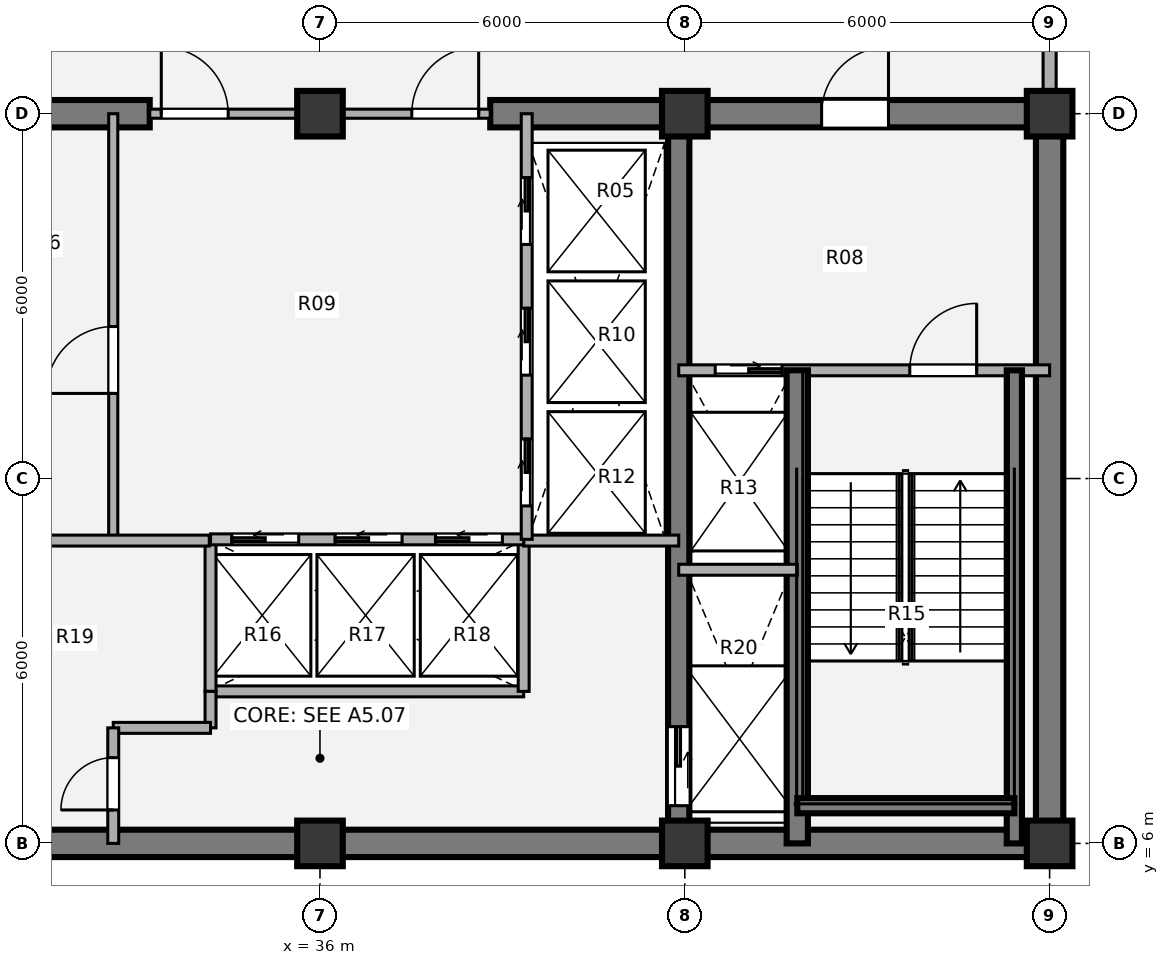
"""IFC4 building model, lengths in metres.
Left out: names, types, materials, properties, quantities, classifications, styles, units other than length and angle.
Written with IfcOpenShell. Run it as: python <this file> out.ifc"""

import sys

from ifc_helpers import new_model, si_unit, direction, frame, frame_2d, origin, origin_2d, place, context, subcontext, project, spatial, rectangle, extrude, source, transform, mapped, element, fill, save


model = new_model("IFC4")
c1 = context("Model", 3, precision=1e-05, world=origin(), true_north=direction((0.0, 1.0)))
c2 = subcontext(c1, "Body", "Model", "MODEL_VIEW")
j1 = project(units=[si_unit("LENGTHUNIT", "METRE"), si_unit("PLANEANGLEUNIT", "RADIAN")], contexts=[c1])
p1 = place(None, origin())
s1 = spatial("IfcSite", under=j1, at=p1, CompositionType="ELEMENT")
p2 = place(p1, origin())
s2 = spatial("IfcBuilding", under=s1, at=p2, CompositionType="ELEMENT")
p3 = place(p2, frame((0.0, 0.0, 151.92)))
s3 = spatial("IfcBuildingStorey", under=s2, at=p3, CompositionType="ELEMENT", Elevation=151.92)
m1 = source(origin(), c2, "Body", "SweptSolid", [
    extrude(rectangle(XDim=0.75, YDim=0.75, at=origin_2d()), origin(), (0.0, 0.0, 1.0), 4.5),
])
for number, where, z_axis, x_axis in (
    (1, (36.0, 6.0, 0.0), (0.0, 0.0, 1.0), (1.0, 0.0, 0.0)),
    (2, (42.0, 6.0, 0.0), (0.0, 0.0, 1.0), (1.0, 0.0, 0.0)),
    (3, (48.0, 6.0, 0.0), (0.0, 0.0, 1.0), (1.0, 0.0, 0.0)),
    (4, (36.0, 18.0, 0.0), (0.0, 0.0, 1.0), (1.0, 0.0, 0.0)),
    (5, (42.0, 18.0, 0.0), (0.0, 0.0, 1.0), (1.0, 0.0, 0.0)),
    (6, (48.0, 18.0, 0.0), (0.0, 0.0, 1.0), (1.0, 0.0, 0.0)),
):
    element("IfcColumn", number, at=place(p3, frame(where, z_axis=z_axis, x_axis=x_axis)), inside=s3, PredefinedType="COLUMN", context=c2, shape_type="MappedRepresentation", body=[
        mapped(m1, transform((0.0, 0.0, 0.0), x_axis=(1.0, 0.0, 0.0), y_axis=(0.0, 1.0, 0.0), z_axis=(0.0, 0.0, 1.0), scale=1.0)),
    ])
p4 = place(p3, frame((48.225, 6.0, 0.0), z_axis=(0.0, 0.0, 1.0), x_axis=(-1.0, 0.0, 0.0)))
e7 = element("IfcWall", 7, at=p4, inside=s3, PredefinedType="SHEAR", context=c2, shape_type="SweptSolid", body=[
    extrude(rectangle(XDim=24.45, YDim=0.45, at=frame_2d((12.225, 0.0))), origin(), (0.0, 0.0, 1.0), 4.5),
])
p5 = place(p3, frame((48.0, 18.0, 0.0), z_axis=(0.0, 0.0, 1.0), x_axis=(0.0, -1.0, 0.0)))
e8 = element("IfcWall", 8, at=p5, inside=s3, PredefinedType="SHEAR", context=c2, shape_type="SweptSolid", body=[
    extrude(rectangle(XDim=12.0, YDim=0.45, at=frame_2d((6.0, 0.0))), origin(), (0.0, 0.0, 1.0), 4.5),
])
p6 = place(p3, frame((23.775, 18.0, 0.0), z_axis=(0.0, 0.0, 1.0), x_axis=(1.0, 0.0, 0.0)))
e9 = element("IfcWall", 9, at=p6, inside=s3, PredefinedType="SHEAR", context=c2, shape_type="SweptSolid", body=[
    extrude(rectangle(XDim=9.425, YDim=0.45, at=frame_2d((4.712, 0.0))), origin(), (0.0, 0.0, 1.0), 4.5),
])
p7 = place(p6, frame((2.95, 0.0, 0.0)))
e10 = element("IfcOpeningElement", 10, at=p7, cuts=e9, PredefinedType="OPENING", context=c2, shape_type="SweptSolid", body=[
    extrude(rectangle(XDim=1.1, YDim=2.1, at=origin_2d()), frame((0.55, 0.235, 1.05), z_axis=(0.0, -1.0, 0.0), x_axis=(1.0, 0.0, 0.0)), (0.0, 0.0, 1.0), 0.47),
])
p8 = place(p3, frame((38.8, 18.0, 0.0), z_axis=(0.0, 0.0, 1.0), x_axis=(1.0, 0.0, 0.0)))
e11 = element("IfcWall", 11, at=p8, inside=s3, PredefinedType="SHEAR", context=c2, shape_type="SweptSolid", body=[
    extrude(rectangle(XDim=9.425, YDim=0.45, at=frame_2d((4.712, 0.0))), origin(), (0.0, 0.0, 1.0), 4.5),
])
p9 = place(p8, frame((5.45, 0.0, 0.0)))
e12 = element("IfcOpeningElement", 12, at=p9, cuts=e11, PredefinedType="OPENING", context=c2, shape_type="SweptSolid", body=[
    extrude(rectangle(XDim=1.1, YDim=2.1, at=origin_2d()), frame((0.55, 0.235, 1.05), z_axis=(0.0, -1.0, 0.0), x_axis=(1.0, 0.0, 0.0)), (0.0, 0.0, 1.0), 0.47),
])
p10 = place(p3, frame((41.9, 18.0, 0.0), z_axis=(0.0, 0.0, 1.0), x_axis=(0.0, -1.0, 0.0)))
e13 = element("IfcWall", 13, at=p10, inside=s3, PredefinedType="SHEAR", context=c2, shape_type="SweptSolid", body=[
    extrude(rectangle(XDim=12.0, YDim=0.35, at=frame_2d((6.0, 0.0))), origin(), (0.0, 0.0, 1.0), 4.5),
])
p11 = place(p10, frame((10.08, 0.0, 0.0)))
e14 = element("IfcOpeningElement", 14, at=p11, cuts=e13, PredefinedType="OPENING", context=c2, shape_type="SweptSolid", body=[
    extrude(rectangle(XDim=1.3, YDim=2.1, at=origin_2d()), frame((0.65, 0.185, 1.05), z_axis=(0.0, -1.0, 0.0), x_axis=(1.0, 0.0, 0.0)), (0.0, 0.0, 1.0), 0.37),
])
p12 = place(p3, frame((48.0, 21.05, 0.0), z_axis=(0.0, 0.0, 1.0), x_axis=(0.0, -1.0, 0.0)))
e15 = element("IfcWall", 15, at=p12, inside=s3, PredefinedType="SOLIDWALL", context=c2, shape_type="SweptSolid", body=[
    extrude(rectangle(XDim=2.695, YDim=0.215, at=frame_2d((1.348, 0.0))), origin(), (0.0, 0.0, 1.0), 2.28),
])
p13 = place(p3, frame((32.6, 11.0, 0.0), z_axis=(0.0, 0.0, 1.0), x_axis=(0.0, 1.0, 0.0)))
e16 = element("IfcWall", 16, at=p13, inside=s3, PredefinedType="PARTITIONING", context=c2, shape_type="SweptSolid", body=[
    extrude(rectangle(XDim=7.0, YDim=0.15, at=frame_2d((3.5, 0.0))), origin(), (0.0, 0.0, 1.0), 4.062),
])
p14 = place(p13, frame((2.4, 0.0, 0.0)))
e17 = element("IfcOpeningElement", 17, at=p14, cuts=e16, PredefinedType="OPENING", context=c2, shape_type="SweptSolid", body=[
    extrude(rectangle(XDim=1.1, YDim=2.1, at=origin_2d()), frame((0.55, 0.085, 1.05), z_axis=(0.0, -1.0, 0.0), x_axis=(1.0, 0.0, 0.0)), (0.0, 0.0, 1.0), 0.17),
])
p15 = place(p3, frame((34.2, 8.5, 0.0), z_axis=(0.0, 0.0, 1.0), x_axis=(1.0, 0.0, 0.0)))
e18 = element("IfcWall", 18, at=p15, inside=s3, PredefinedType="PARTITIONING", context=c2, shape_type="SweptSolid", body=[
    extrude(rectangle(XDim=5.15, YDim=0.18, at=frame_2d((2.575, 0.0))), origin(), (0.0, 0.0, 1.0), 4.062),
])
for number, where, z_axis, x_axis in (
    (19, (34.2, 8.5, 0.0), (0.0, 0.0, 1.0), (0.0, 1.0, 0.0)),
    (20, (39.35, 8.5, 0.0), (0.0, 0.0, 1.0), (0.0, 1.0, 0.0)),
):
    element("IfcWall", number, at=place(p3, frame(where, z_axis=z_axis, x_axis=x_axis)), inside=s3, PredefinedType="PARTITIONING", context=c2, shape_type="SweptSolid", body=[
        extrude(rectangle(XDim=2.5, YDim=0.18, at=frame_2d((1.25, 0.0))), origin(), (0.0, 0.0, 1.0), 4.062),
    ])
p16 = place(p3, frame((30.1, 10.98, 0.0), z_axis=(0.0, 0.0, 1.0), x_axis=(1.0, 0.0, 0.0)))
e21 = element("IfcWall", 21, at=p16, inside=s3, PredefinedType="PARTITIONING", context=c2, shape_type="SweptSolid", body=[
    extrude(rectangle(XDim=4.08, YDim=0.18, at=frame_2d((2.04, 0.0))), origin(), (0.0, 0.0, 1.0), 4.062),
])
p17 = place(p3, frame((34.2, 7.9, 0.0), z_axis=(0.0, 0.0, 1.0), x_axis=(0.0, 1.0, 0.0)))
e22 = element("IfcWall", 22, at=p17, inside=s3, PredefinedType="PARTITIONING", context=c2, shape_type="SweptSolid", body=[
    extrude(rectangle(XDim=0.6, YDim=0.18, at=frame_2d((0.3, 0.0))), origin(), (0.0, 0.0, 1.0), 4.062),
])
p18 = place(p3, frame((32.6, 7.9, 0.0), z_axis=(0.0, 0.0, 1.0), x_axis=(1.0, 0.0, 0.0)))
e23 = element("IfcWall", 23, at=p18, inside=s3, PredefinedType="PARTITIONING", context=c2, shape_type="SweptSolid", body=[
    extrude(rectangle(XDim=1.6, YDim=0.18, at=frame_2d((0.8, 0.0))), origin(), (0.0, 0.0, 1.0), 4.062),
])
p19 = place(p3, frame((32.6, 6.0, 0.0), z_axis=(0.0, 0.0, 1.0), x_axis=(0.0, 1.0, 0.0)))
e24 = element("IfcWall", 24, at=p19, inside=s3, PredefinedType="PARTITIONING", context=c2, shape_type="SweptSolid", body=[
    extrude(rectangle(XDim=1.9, YDim=0.18, at=frame_2d((0.95, 0.0))), origin(), (0.0, 0.0, 1.0), 4.062),
])
p20 = place(p19, frame((0.55, 0.0, 0.0)))
e25 = element("IfcOpeningElement", 25, at=p20, cuts=e24, PredefinedType="OPENING", context=c2, shape_type="SweptSolid", body=[
    extrude(rectangle(XDim=0.86, YDim=2.1, at=origin_2d()), frame((0.43, 0.1, 1.05), z_axis=(0.0, -1.0, 0.0), x_axis=(1.0, 0.0, 0.0)), (0.0, 0.0, 1.0), 0.2),
])
p21 = place(p3, frame((39.35, 10.98, 0.0), z_axis=(0.0, 0.0, 1.0), x_axis=(1.0, 0.0, 0.0)))
e26 = element("IfcWall", 26, at=p21, inside=s3, PredefinedType="PARTITIONING", context=c2, shape_type="SweptSolid", body=[
    extrude(rectangle(XDim=2.55, YDim=0.18, at=frame_2d((1.275, 0.0))), origin(), (0.0, 0.0, 1.0), 4.062),
])
p22 = place(p3, frame((33.2, 18.0, 0.0), z_axis=(0.0, 0.0, 1.0), x_axis=(1.0, 0.0, 0.0)))
e27 = element("IfcWall", 27, at=p22, inside=s3, PredefinedType="PARTITIONING", context=c2, shape_type="SweptSolid", body=[
    extrude(rectangle(XDim=5.6, YDim=0.15, at=frame_2d((2.8, 0.0))), origin(), (0.0, 0.0, 1.0), 3.077),
])
p23 = place(p22, frame((0.19, 0.0, 0.0)))
e28 = element("IfcOpeningElement", 28, at=p23, cuts=e27, PredefinedType="OPENING", context=c2, shape_type="SweptSolid", body=[
    extrude(rectangle(XDim=1.1, YDim=2.1, at=origin_2d()), frame((0.55, 0.085, 1.05), z_axis=(0.0, -1.0, 0.0), x_axis=(1.0, 0.0, 0.0)), (0.0, 0.0, 1.0), 0.17),
])
p24 = place(p22, frame((4.31, 0.0, 0.0)))
e29 = element("IfcOpeningElement", 29, at=p24, cuts=e27, PredefinedType="OPENING", context=c2, shape_type="SweptSolid", body=[
    extrude(rectangle(XDim=1.1, YDim=2.1, at=origin_2d()), frame((0.55, 0.085, 1.05), z_axis=(0.0, -1.0, 0.0), x_axis=(1.0, 0.0, 0.0)), (0.0, 0.0, 1.0), 0.17),
])
p25 = place(p3, frame((41.9, 13.78, 0.0), z_axis=(0.0, 0.0, 1.0), x_axis=(1.0, 0.0, 0.0)))
e30 = element("IfcWall", 30, at=p25, inside=s3, PredefinedType="PARTITIONING", context=c2, shape_type="SweptSolid", body=[
    extrude(rectangle(XDim=6.1, YDim=0.18, at=frame_2d((3.05, 0.0))), origin(), (0.0, 0.0, 1.0), 4.062),
])
p26 = place(p25, frame((0.6, 0.0, 0.0)))
e31 = element("IfcOpeningElement", 31, at=p26, cuts=e30, PredefinedType="OPENING", context=c2, shape_type="SweptSolid", body=[
    extrude(rectangle(XDim=1.1, YDim=2.1, at=origin_2d()), frame((0.55, 0.1, 1.05), z_axis=(0.0, -1.0, 0.0), x_axis=(1.0, 0.0, 0.0)), (0.0, 0.0, 1.0), 0.2),
])
p27 = place(p25, frame((3.8, 0.0, 0.0)))
e32 = element("IfcOpeningElement", 32, at=p27, cuts=e30, PredefinedType="OPENING", context=c2, shape_type="SweptSolid", body=[
    extrude(rectangle(XDim=1.1, YDim=2.1, at=origin_2d()), frame((0.55, 0.1, 1.05), z_axis=(0.0, -1.0, 0.0), x_axis=(1.0, 0.0, 0.0)), (0.0, 0.0, 1.0), 0.2),
])
p28 = place(p3, frame((43.85, 6.0, 0.0), z_axis=(0.0, 0.0, 1.0), x_axis=(0.0, 1.0, 0.0)))
e33 = element("IfcWall", 33, at=p28, inside=s3, PredefinedType="SHEAR", context=c2, shape_type="SweptSolid", body=[
    extrude(rectangle(XDim=7.78, YDim=0.35, at=frame_2d((3.89, 0.0))), origin(), (0.0, 0.0, 1.0), 4.412),
])
p29 = place(p3, frame((47.42, 6.0, 0.0), z_axis=(0.0, 0.0, 1.0), x_axis=(0.0, 1.0, 0.0)))
e34 = element("IfcWall", 34, at=p29, inside=s3, PredefinedType="SHEAR", context=c2, shape_type="SweptSolid", body=[
    extrude(rectangle(XDim=7.78, YDim=0.25, at=frame_2d((3.89, 0.0))), origin(), (0.0, 0.0, 1.0), 4.412),
])
p30 = place(p3, frame((43.85, 6.62, 0.0), z_axis=(0.0, 0.0, 1.0), x_axis=(1.0, 0.0, 0.0)))
e35 = element("IfcWall", 35, at=p30, inside=s3, PredefinedType="SHEAR", context=c2, shape_type="SweptSolid", body=[
    extrude(rectangle(XDim=3.57, YDim=0.25, at=frame_2d((1.785, 0.0))), origin(), (0.0, 0.0, 1.0), 4.412),
])
p31 = place(p3, frame((41.9, 10.5, 0.0), z_axis=(0.0, 0.0, 1.0), x_axis=(1.0, 0.0, 0.0)))
e36 = element("IfcWall", 36, at=p31, inside=s3, PredefinedType="PARTITIONING", context=c2, shape_type="SweptSolid", body=[
    extrude(rectangle(XDim=1.95, YDim=0.18, at=frame_2d((0.975, 0.0))), origin(), (0.0, 0.0, 1.0), 4.062),
])
p32 = place(p3, frame((34.2, 11.0, 0.0), z_axis=(0.0, 0.0, 1.0), x_axis=(1.0, 0.0, 0.0)))
e37 = element("IfcWall", 37, at=p32, inside=s3, PredefinedType="PARTITIONING", context=c2, shape_type="SweptSolid", body=[
    extrude(rectangle(XDim=5.15, YDim=0.18, at=frame_2d((2.575, 0.0))), origin(), (0.0, 0.0, 1.0), 4.062),
])
p33 = place(p32, frame((0.35, 0.0, 0.0)))
e38 = element("IfcOpeningElement", 38, at=p33, cuts=e37, PredefinedType="OPENING", context=c2, shape_type="SweptSolid", body=[
    extrude(rectangle(XDim=1.1, YDim=2.1, at=origin_2d()), frame((0.55, 0.1, 1.05), z_axis=(0.0, -1.0, 0.0), x_axis=(1.0, 0.0, 0.0)), (0.0, 0.0, 1.0), 0.2),
])
p34 = place(p32, frame((2.05, 0.0, 0.0)))
e39 = element("IfcOpeningElement", 39, at=p34, cuts=e37, PredefinedType="OPENING", context=c2, shape_type="SweptSolid", body=[
    extrude(rectangle(XDim=1.1, YDim=2.1, at=origin_2d()), frame((0.55, 0.1, 1.05), z_axis=(0.0, -1.0, 0.0), x_axis=(1.0, 0.0, 0.0)), (0.0, 0.0, 1.0), 0.2),
])
p35 = place(p32, frame((3.7, 0.0, 0.0)))
e40 = element("IfcOpeningElement", 40, at=p35, cuts=e37, PredefinedType="OPENING", context=c2, shape_type="SweptSolid", body=[
    extrude(rectangle(XDim=1.1, YDim=2.1, at=origin_2d()), frame((0.55, 0.1, 1.05), z_axis=(0.0, -1.0, 0.0), x_axis=(1.0, 0.0, 0.0)), (0.0, 0.0, 1.0), 0.2),
])
p36 = place(p3, frame((39.4, 11.0, 0.0), z_axis=(0.0, 0.0, 1.0), x_axis=(0.0, 1.0, 0.0)))
e41 = element("IfcWall", 41, at=p36, inside=s3, PredefinedType="PARTITIONING", context=c2, shape_type="SweptSolid", body=[
    extrude(rectangle(XDim=7.0, YDim=0.18, at=frame_2d((3.5, 0.0))), origin(), (0.0, 0.0, 1.0), 4.062),
])
p37 = place(p36, frame((0.55, 0.0, 0.0)))
e42 = element("IfcOpeningElement", 42, at=p37, cuts=e41, PredefinedType="OPENING", context=c2, shape_type="SweptSolid", body=[
    extrude(rectangle(XDim=1.1, YDim=2.1, at=origin_2d()), frame((0.55, 0.1, 1.05), z_axis=(0.0, -1.0, 0.0), x_axis=(1.0, 0.0, 0.0)), (0.0, 0.0, 1.0), 0.2),
])
p38 = place(p36, frame((2.7, 0.0, 0.0)))
e43 = element("IfcOpeningElement", 43, at=p38, cuts=e41, PredefinedType="OPENING", context=c2, shape_type="SweptSolid", body=[
    extrude(rectangle(XDim=1.1, YDim=2.1, at=origin_2d()), frame((0.55, 0.1, 1.05), z_axis=(0.0, -1.0, 0.0), x_axis=(1.0, 0.0, 0.0)), (0.0, 0.0, 1.0), 0.2),
])
p39 = place(p36, frame((4.85, 0.0, 0.0)))
e44 = element("IfcOpeningElement", 44, at=p39, cuts=e41, PredefinedType="OPENING", context=c2, shape_type="SweptSolid", body=[
    extrude(rectangle(XDim=1.1, YDim=2.1, at=origin_2d()), frame((0.55, 0.1, 1.05), z_axis=(0.0, -1.0, 0.0), x_axis=(1.0, 0.0, 0.0)), (0.0, 0.0, 1.0), 0.2),
])
m2 = source(origin(), c2, "Body", "SweptSolid", [
    extrude(rectangle(XDim=1.1, YDim=2.1, at=origin_2d()), frame((0.55, 0.025, 1.05), z_axis=(0.0, -1.0, 0.0), x_axis=(1.0, 0.0, 0.0)), (0.0, 0.0, 1.0), 0.05),
])
p40 = place(p14, origin())
e45 = element("IfcDoor", 45, at=p40, inside=s3, OperationType="SINGLE_SWING_LEFT", PredefinedType="DOOR", context=c2, shape_type="MappedRepresentation", body=[
    mapped(m2, transform((0.0, 0.0, 0.0), x_axis=(1.0, 0.0, 0.0), y_axis=(0.0, 1.0, 0.0), z_axis=(0.0, 0.0, 1.0), scale=1.0)),
])
fill(e17, e45)
m3 = source(origin(), c2, "Body", "SweptSolid", [
    extrude(rectangle(XDim=0.86, YDim=2.1, at=origin_2d()), frame((0.43, 0.025, 1.05), z_axis=(0.0, -1.0, 0.0), x_axis=(1.0, 0.0, 0.0)), (0.0, 0.0, 1.0), 0.05),
])
p41 = place(p20, origin())
e46 = element("IfcDoor", 46, at=p41, inside=s3, OperationType="SINGLE_SWING_LEFT", PredefinedType="DOOR", context=c2, shape_type="MappedRepresentation", body=[
    mapped(m3, transform((0.0, 0.0, 0.0), x_axis=(1.0, 0.0, 0.0), y_axis=(0.0, 1.0, 0.0), z_axis=(0.0, 0.0, 1.0), scale=1.0)),
])
fill(e25, e46)
m4 = source(origin(), c2, "Body", "SweptSolid", [
    extrude(rectangle(XDim=1.1, YDim=2.1, at=origin_2d()), frame((0.55, 0.025, 1.05), z_axis=(0.0, -1.0, 0.0), x_axis=(1.0, 0.0, 0.0)), (0.0, 0.0, 1.0), 0.05),
])
p42 = place(p23, origin())
e47 = element("IfcDoor", 47, at=p42, inside=s3, OperationType="SINGLE_SWING_LEFT", PredefinedType="DOOR", context=c2, shape_type="MappedRepresentation", body=[
    mapped(m4, transform((0.0, 0.0, 0.0), x_axis=(1.0, 0.0, 0.0), y_axis=(0.0, 1.0, 0.0), z_axis=(0.0, 0.0, 1.0), scale=1.0)),
])
fill(e28, e47)
p43 = place(p24, origin())
e48 = element("IfcDoor", 48, at=p43, inside=s3, OperationType="SINGLE_SWING_RIGHT", PredefinedType="DOOR", context=c2, shape_type="MappedRepresentation", body=[
    mapped(m4, transform((0.0, 0.0, 0.0), x_axis=(1.0, 0.0, 0.0), y_axis=(0.0, 1.0, 0.0), z_axis=(0.0, 0.0, 1.0), scale=1.0)),
])
fill(e29, e48)
m5 = source(origin(), c2, "Body", "SweptSolid", [
    extrude(rectangle(XDim=1.1, YDim=2.1, at=origin_2d()), frame((0.55, 0.025, 1.05), z_axis=(0.0, -1.0, 0.0), x_axis=(1.0, 0.0, 0.0)), (0.0, 0.0, 1.0), 0.05),
])
p44 = place(p26, origin())
e49 = element("IfcDoor", 49, at=p44, inside=s3, OperationType="SLIDING_TO_RIGHT", PredefinedType="DOOR", context=c2, shape_type="MappedRepresentation", body=[
    mapped(m5, transform((0.0, 0.0, 0.0), x_axis=(1.0, 0.0, 0.0), y_axis=(0.0, 1.0, 0.0), z_axis=(0.0, 0.0, 1.0), scale=1.0)),
])
fill(e31, e49)
m6 = source(origin(), c2, "Body", "SweptSolid", [
    extrude(rectangle(XDim=1.1, YDim=2.1, at=origin_2d()), frame((0.55, 0.025, 1.05), z_axis=(0.0, -1.0, 0.0), x_axis=(1.0, 0.0, 0.0)), (0.0, 0.0, 1.0), 0.05),
])
p45 = place(p27, origin())
e50 = element("IfcDoor", 50, at=p45, inside=s3, OperationType="SINGLE_SWING_RIGHT", PredefinedType="DOOR", context=c2, shape_type="MappedRepresentation", body=[
    mapped(m6, transform((0.0, 0.0, 0.0), x_axis=(1.0, 0.0, 0.0), y_axis=(0.0, 1.0, 0.0), z_axis=(0.0, 0.0, 1.0), scale=1.0)),
])
fill(e32, e50)
m7 = source(origin(), c2, "Body", "SweptSolid", [
    extrude(rectangle(XDim=1.3, YDim=2.1, at=origin_2d()), frame((0.65, 0.025, 1.05), z_axis=(0.0, -1.0, 0.0), x_axis=(1.0, 0.0, 0.0)), (0.0, 0.0, 1.0), 0.05),
])
p46 = place(p11, origin())
e51 = element("IfcDoor", 51, at=p46, inside=s3, OperationType="SLIDING_TO_LEFT", PredefinedType="DOOR", context=c2, shape_type="MappedRepresentation", body=[
    mapped(m7, transform((0.0, 0.0, 0.0), x_axis=(1.0, 0.0, 0.0), y_axis=(0.0, 1.0, 0.0), z_axis=(0.0, 0.0, 1.0), scale=1.0)),
])
fill(e14, e51)
p47 = place(p9, origin())
e52 = element("IfcDoor", 52, at=p47, inside=s3, OperationType="SINGLE_SWING_RIGHT", PredefinedType="DOOR", context=c2, shape_type="MappedRepresentation", body=[
    mapped(m4, transform((0.0, 0.0, 0.0), x_axis=(1.0, 0.0, 0.0), y_axis=(0.0, 1.0, 0.0), z_axis=(0.0, 0.0, 1.0), scale=1.0)),
])
fill(e12, e52)
p48 = place(p33, origin())
e53 = element("IfcDoor", 53, at=p48, inside=s3, OperationType="SLIDING_TO_LEFT", PredefinedType="DOOR", context=c2, shape_type="MappedRepresentation", body=[
    mapped(m5, transform((0.0, 0.0, 0.0), x_axis=(1.0, 0.0, 0.0), y_axis=(0.0, 1.0, 0.0), z_axis=(0.0, 0.0, 1.0), scale=1.0)),
])
fill(e38, e53)
p49 = place(p34, origin())
e54 = element("IfcDoor", 54, at=p49, inside=s3, OperationType="SLIDING_TO_LEFT", PredefinedType="DOOR", context=c2, shape_type="MappedRepresentation", body=[
    mapped(m5, transform((0.0, 0.0, 0.0), x_axis=(1.0, 0.0, 0.0), y_axis=(0.0, 1.0, 0.0), z_axis=(0.0, 0.0, 1.0), scale=1.0)),
])
fill(e39, e54)
p50 = place(p35, origin())
e55 = element("IfcDoor", 55, at=p50, inside=s3, OperationType="SLIDING_TO_LEFT", PredefinedType="DOOR", context=c2, shape_type="MappedRepresentation", body=[
    mapped(m5, transform((0.0, 0.0, 0.0), x_axis=(1.0, 0.0, 0.0), y_axis=(0.0, 1.0, 0.0), z_axis=(0.0, 0.0, 1.0), scale=1.0)),
])
fill(e40, e55)
p51 = place(p37, origin())
e56 = element("IfcDoor", 56, at=p51, inside=s3, OperationType="SLIDING_TO_RIGHT", PredefinedType="DOOR", context=c2, shape_type="MappedRepresentation", body=[
    mapped(m5, transform((0.0, 0.0, 0.0), x_axis=(1.0, 0.0, 0.0), y_axis=(0.0, 1.0, 0.0), z_axis=(0.0, 0.0, 1.0), scale=1.0)),
])
fill(e42, e56)
p52 = place(p38, origin())
e57 = element("IfcDoor", 57, at=p52, inside=s3, OperationType="SLIDING_TO_RIGHT", PredefinedType="DOOR", context=c2, shape_type="MappedRepresentation", body=[
    mapped(m5, transform((0.0, 0.0, 0.0), x_axis=(1.0, 0.0, 0.0), y_axis=(0.0, 1.0, 0.0), z_axis=(0.0, 0.0, 1.0), scale=1.0)),
])
fill(e43, e57)
p53 = place(p39, origin())
e58 = element("IfcDoor", 58, at=p53, inside=s3, OperationType="SLIDING_TO_RIGHT", PredefinedType="DOOR", context=c2, shape_type="MappedRepresentation", body=[
    mapped(m5, transform((0.0, 0.0, 0.0), x_axis=(1.0, 0.0, 0.0), y_axis=(0.0, 1.0, 0.0), z_axis=(0.0, 0.0, 1.0), scale=1.0)),
])
fill(e44, e58)
save(model, sys.argv[1])
